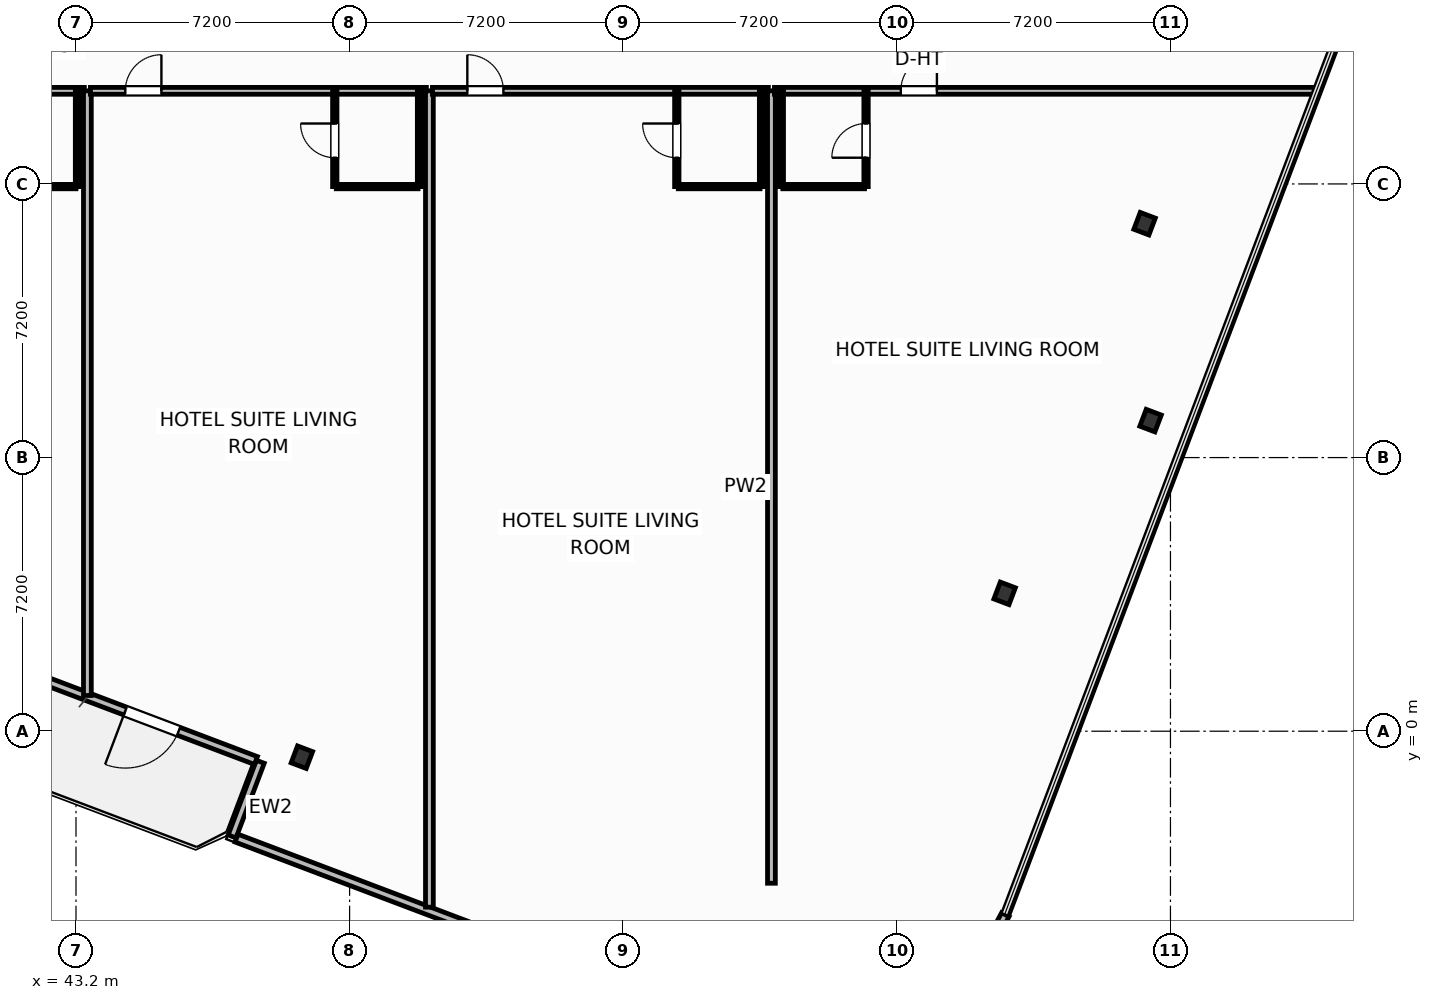
"""IFC4 building model, lengths in metres.
Left out: names, types, materials, properties, quantities, classifications, styles, units other than length and angle.
Written with IfcOpenShell. Run it as: python <this file> out.ifc"""

import sys

from ifc_helpers import new_model, si_unit, direction, frame, frame_2d, origin, origin_2d, place, context, subcontext, project, spatial, rectangle, i_section, extrude, element, fill, save


model = new_model("IFC4")
c1 = context("Model", 3, precision=1e-05, world=origin(), true_north=direction((0.0, 1.0)))
c2 = subcontext(c1, "Body", "Model", "MODEL_VIEW")
j1 = project(units=[si_unit("LENGTHUNIT", "METRE"), si_unit("PLANEANGLEUNIT", "RADIAN")], contexts=[c1])
p1 = place(None, origin())
s1 = spatial("IfcSite", under=j1, at=p1, CompositionType="ELEMENT")
p2 = place(p1, origin())
s2 = spatial("IfcBuilding", under=s1, at=p2, CompositionType="ELEMENT")
p3 = place(p2, frame((0.0, 0.0, 76.2)))
s3 = spatial("IfcBuildingStorey", under=s2, at=p3, CompositionType="ELEMENT", Elevation=76.2)
for number, where, z_axis, x_axis in (
    (1, (49.144, -0.684, 0.0), (0.0, 0.0, 1.0), (0.935, -0.354, 0.0)),
    (2, (67.637, 3.628, 0.0), (0.0, 0.0, 1.0), (0.935, -0.354, 0.0)),
    (3, (71.477, 8.173, 0.0), (0.0, 0.0, 1.0), (0.935, -0.354, 0.0)),
    (4, (71.319, 13.354, 0.0), (0.0, 0.0, 1.0), (0.935, -0.354, 0.0)),
):
    element("IfcColumn", number, at=place(p3, frame(where, z_axis=z_axis, x_axis=x_axis)), inside=s3, PredefinedType="COLUMN", context=c2, shape_type="SweptSolid", body=[
        extrude(i_section(OverallWidth=0.424, OverallDepth=0.474, WebThickness=0.048, FlangeThickness=0.077, FilletRadius=0.025, at=origin_2d()), origin(), (0.0, 0.0, 1.0), 3.7),
    ])
p4 = place(p3, frame((47.935, -0.771, 0.0), z_axis=(0.0, 0.0, 1.0), x_axis=(-0.935227640088, 0.354046976001, 0.0)))
e5 = element("IfcWall", 5, at=p4, inside=s3, PredefinedType="SOLIDWALL", context=c2, shape_type="SweptSolid", body=[
    extrude(rectangle(XDim=6.0, YDim=0.22, at=frame_2d((3.0, 0.0))), origin(), (0.0, 0.0, 1.0), 2.73),
])
p5 = place(p4, frame((2.176, 0.0, 0.0)))
e6 = element("IfcOpeningElement", 6, at=p5, cuts=e5, PredefinedType="OPENING", context=c2, shape_type="SweptSolid", body=[
    extrude(rectangle(XDim=1.5, YDim=2.25, at=frame_2d((0.75, 1.125))), frame((0.0, 0.12, 0.0), z_axis=(0.0, -1.0, 0.0), x_axis=(1.0, 0.0, 0.0)), (0.0, 0.0, 1.0), 0.24),
])
p6 = place(p3, frame((48.051, -0.805, 0.0), z_axis=(0.0, 0.0, 1.0), x_axis=(-0.353988291547, -0.935249854022, 0.0)))
e7 = element("IfcWall", 7, at=p6, inside=s3, PredefinedType="SOLIDWALL", context=c2, shape_type="SweptSolid", body=[
    extrude(rectangle(XDim=2.1, YDim=0.22, at=frame_2d((1.05, 0.0))), origin(), (0.0, 0.0, 1.0), 2.73),
])
p7 = place(p3, frame((47.424, -2.813, 0.0), z_axis=(0.0, 0.0, 1.0), x_axis=(0.935225962032, -0.354051408614, 0.0)))
e8 = element("IfcWall", 8, at=p7, inside=s3, PredefinedType="SOLIDWALL", context=c2, shape_type="SweptSolid", body=[
    extrude(rectangle(XDim=14.347, YDim=0.22, at=frame_2d((7.173, 0.0))), origin(), (0.0, 0.0, 1.0), 2.73),
])
p8 = place(p7, frame((6.348, 0.0, 0.8)))
e9 = element("IfcOpeningElement", 9, at=p8, cuts=e8, PredefinedType="OPENING", context=c2, shape_type="SweptSolid", body=[
    extrude(rectangle(XDim=1.65, YDim=1.65, at=frame_2d((0.825, 0.825))), frame((0.0, 0.12, 0.0), z_axis=(0.0, -1.0, 0.0), x_axis=(1.0, 0.0, 0.0)), (0.0, 0.0, 1.0), 0.24),
])
p9 = place(p3, frame((67.015, -6.019, 0.0), z_axis=(0.0, 0.0, 1.0), x_axis=(0.473077364598, 0.881020889142, 0.0)))
e10 = element("IfcWall", 10, at=p9, inside=s3, PredefinedType="SOLIDWALL", context=c2, shape_type="SweptSolid", body=[
    extrude(rectangle(XDim=1.353, YDim=0.22, at=frame_2d((0.677, 0.0))), origin(), (0.0, 0.0, 1.0), 2.73),
])
p10 = place(p3, frame((34.58, 16.85, 0.0), z_axis=(0.0, 0.0, 1.0), x_axis=(1.0, 0.0, 0.0)))
e11 = element("IfcWall", 11, at=p10, inside=s3, PredefinedType="PARTITIONING", context=c2, shape_type="SweptSolid", body=[
    extrude(rectangle(XDim=8.84, YDim=0.18, at=frame_2d((4.42, 0.0))), origin(), (0.0, 0.0, 1.0), 3.45),
])
p11 = place(p10, frame((0.918, 0.0, 0.0)))
e12 = element("IfcOpeningElement", 12, at=p11, cuts=e11, PredefinedType="OPENING", context=c2, shape_type="SweptSolid", body=[
    extrude(rectangle(XDim=0.95, YDim=2.15, at=frame_2d((0.475, 1.075))), frame((0.0, 0.1, 0.0), z_axis=(0.0, -1.0, 0.0), x_axis=(1.0, 0.0, 0.0)), (0.0, 0.0, 1.0), 0.2),
])
p12 = place(p3, frame((41.05, 14.33, 0.0), z_axis=(0.0, 0.0, 1.0), x_axis=(1.0, 0.0, 0.0)))
e13 = element("IfcWall", 13, at=p12, inside=s3, PredefinedType="PARTITIONING", context=c2, shape_type="SweptSolid", body=[
    extrude(rectangle(XDim=2.15, YDim=0.115, at=frame_2d((1.075, 0.0))), origin(), (0.0, 0.0, 1.0), 3.45),
])
p13 = place(p3, frame((43.24, 14.33, 0.0), z_axis=(0.0, 0.0, 1.0), x_axis=(0.0, 1.0, 0.0)))
e14 = element("IfcWall", 14, at=p13, inside=s3, PredefinedType="PARTITIONING", context=c2, shape_type="SweptSolid", body=[
    extrude(rectangle(XDim=2.52, YDim=0.115, at=frame_2d((1.26, 0.0))), origin(), (0.0, 0.0, 1.0), 2.58),
])
p14 = place(p3, frame((43.5, 0.939, 0.0), z_axis=(0.0, 0.0, 1.0), x_axis=(0.0, 1.0, 0.0)))
e15 = element("IfcWall", 15, at=p14, inside=s3, PredefinedType="PARTITIONING", context=c2, shape_type="SweptSolid", body=[
    extrude(rectangle(XDim=15.911, YDim=0.205, at=frame_2d((7.955, 0.0))), origin(), (0.0, 0.0, 1.0), 2.58),
])
p15 = place(p3, frame((43.58, 16.85, 0.0), z_axis=(0.0, 0.0, 1.0), x_axis=(1.0, 0.0, 0.0)))
e16 = element("IfcWall", 16, at=p15, inside=s3, PredefinedType="PARTITIONING", context=c2, shape_type="SweptSolid", body=[
    extrude(rectangle(XDim=8.84, YDim=0.18, at=frame_2d((4.42, 0.0))), origin(), (0.0, 0.0, 1.0), 3.45),
])
p16 = place(p15, frame((0.918, 0.0, 0.0)))
e17 = element("IfcOpeningElement", 17, at=p16, cuts=e16, PredefinedType="OPENING", context=c2, shape_type="SweptSolid", body=[
    extrude(rectangle(XDim=0.95, YDim=2.15, at=frame_2d((0.475, 1.075))), frame((0.0, 0.1, 0.0), z_axis=(0.0, -1.0, 0.0), x_axis=(1.0, 0.0, 0.0)), (0.0, 0.0, 1.0), 0.2),
])
p17 = place(p3, frame((50.05, 14.33, 0.0), z_axis=(0.0, 0.0, 1.0), x_axis=(1.0, 0.0, 0.0)))
e18 = element("IfcWall", 18, at=p17, inside=s3, PredefinedType="PARTITIONING", context=c2, shape_type="SweptSolid", body=[
    extrude(rectangle(XDim=2.15, YDim=0.115, at=frame_2d((1.075, 0.0))), origin(), (0.0, 0.0, 1.0), 3.45),
])
p18 = place(p3, frame((50.01, 14.33, 0.0), z_axis=(0.0, 0.0, 1.0), x_axis=(0.0, 1.0, 0.0)))
e19 = element("IfcWall", 19, at=p18, inside=s3, PredefinedType="PARTITIONING", context=c2, shape_type="SweptSolid", body=[
    extrude(rectangle(XDim=2.52, YDim=0.115, at=frame_2d((1.26, 0.0))), origin(), (0.0, 0.0, 1.0), 3.45),
])
p19 = place(p18, frame((0.76, 0.0, 0.0)))
e20 = element("IfcOpeningElement", 20, at=p19, cuts=e19, PredefinedType="OPENING", context=c2, shape_type="SweptSolid", body=[
    extrude(rectangle(XDim=0.9, YDim=2.05, at=frame_2d((0.45, 1.025))), frame((0.0, 0.067, 0.0), z_axis=(0.0, -1.0, 0.0), x_axis=(1.0, 0.0, 0.0)), (0.0, 0.0, 1.0), 0.135),
])
p20 = place(p3, frame((52.24, 14.33, 0.0), z_axis=(0.0, 0.0, 1.0), x_axis=(0.0, 1.0, 0.0)))
e21 = element("IfcWall", 21, at=p20, inside=s3, PredefinedType="PARTITIONING", context=c2, shape_type="SweptSolid", body=[
    extrude(rectangle(XDim=2.52, YDim=0.115, at=frame_2d((1.26, 0.0))), origin(), (0.0, 0.0, 1.0), 3.45),
])
p21 = place(p3, frame((52.5, -4.63, 0.0), z_axis=(0.0, 0.0, 1.0), x_axis=(0.0, 1.0, 0.0)))
e22 = element("IfcWall", 22, at=p21, inside=s3, PredefinedType="PARTITIONING", context=c2, shape_type="SweptSolid", body=[
    extrude(rectangle(XDim=21.48, YDim=0.205, at=frame_2d((10.74, 0.0))), origin(), (0.0, 0.0, 1.0), 2.58),
])
p22 = place(p3, frame((52.58, 16.85, 0.0), z_axis=(0.0, 0.0, 1.0), x_axis=(1.0, 0.0, 0.0)))
e23 = element("IfcWall", 23, at=p22, inside=s3, PredefinedType="PARTITIONING", context=c2, shape_type="SweptSolid", body=[
    extrude(rectangle(XDim=8.84, YDim=0.18, at=frame_2d((4.42, 0.0))), origin(), (0.0, 0.0, 1.0), 2.58),
])
p23 = place(p22, frame((0.918, 0.0, 0.0)))
e24 = element("IfcOpeningElement", 24, at=p23, cuts=e23, PredefinedType="OPENING", context=c2, shape_type="SweptSolid", body=[
    extrude(rectangle(XDim=0.95, YDim=2.15, at=frame_2d((0.475, 1.075))), frame((0.0, 0.1, 0.0), z_axis=(0.0, -1.0, 0.0), x_axis=(1.0, 0.0, 0.0)), (0.0, 0.0, 1.0), 0.2),
])
p24 = place(p3, frame((59.05, 14.33, 0.0), z_axis=(0.0, 0.0, 1.0), x_axis=(1.0, 0.0, 0.0)))
e25 = element("IfcWall", 25, at=p24, inside=s3, PredefinedType="PARTITIONING", context=c2, shape_type="SweptSolid", body=[
    extrude(rectangle(XDim=2.15, YDim=0.115, at=frame_2d((1.075, 0.0))), origin(), (0.0, 0.0, 1.0), 3.45),
])
p25 = place(p3, frame((59.01, 14.33, 0.0), z_axis=(0.0, 0.0, 1.0), x_axis=(0.0, 1.0, 0.0)))
e26 = element("IfcWall", 26, at=p25, inside=s3, PredefinedType="PARTITIONING", context=c2, shape_type="SweptSolid", body=[
    extrude(rectangle(XDim=2.52, YDim=0.115, at=frame_2d((1.26, 0.0))), origin(), (0.0, 0.0, 1.0), 3.45),
])
p26 = place(p25, frame((0.76, 0.0, 0.0)))
e27 = element("IfcOpeningElement", 27, at=p26, cuts=e26, PredefinedType="OPENING", context=c2, shape_type="SweptSolid", body=[
    extrude(rectangle(XDim=0.9, YDim=2.05, at=frame_2d((0.45, 1.025))), frame((0.0, 0.067, 0.0), z_axis=(0.0, -1.0, 0.0), x_axis=(1.0, 0.0, 0.0)), (0.0, 0.0, 1.0), 0.135),
])
p27 = place(p3, frame((61.24, 14.33, 0.0), z_axis=(0.0, 0.0, 1.0), x_axis=(0.0, 1.0, 0.0)))
e28 = element("IfcWall", 28, at=p27, inside=s3, PredefinedType="PARTITIONING", context=c2, shape_type="SweptSolid", body=[
    extrude(rectangle(XDim=2.52, YDim=0.115, at=frame_2d((1.26, 0.0))), origin(), (0.0, 0.0, 1.0), 3.45),
])
p28 = place(p3, frame((61.5, -4.0, 0.0), z_axis=(0.0, 0.0, 1.0), x_axis=(0.0, 1.0, 0.0)))
e29 = element("IfcWall", 29, at=p28, inside=s3, PredefinedType="PARTITIONING", context=c2, shape_type="SweptSolid", body=[
    extrude(rectangle(XDim=20.85, YDim=0.205, at=frame_2d((10.425, 0.0))), origin(), (0.0, 0.0, 1.0), 3.45),
])
p29 = place(p3, frame((61.58, 16.85, 0.0), z_axis=(0.0, 0.0, 1.0), x_axis=(1.0, 0.0, 0.0)))
e30 = element("IfcWall", 30, at=p29, inside=s3, PredefinedType="PARTITIONING", context=c2, shape_type="SweptSolid", body=[
    extrude(rectangle(XDim=14.222, YDim=0.18, at=frame_2d((7.111, 0.0))), origin(), (0.0, 0.0, 1.0), 3.45),
])
p30 = place(p29, frame((3.325, 0.0, 0.0)))
e31 = element("IfcOpeningElement", 31, at=p30, cuts=e30, PredefinedType="OPENING", context=c2, shape_type="SweptSolid", body=[
    extrude(rectangle(XDim=0.95, YDim=2.15, at=frame_2d((0.475, 1.075))), frame((0.0, 0.1, 0.0), z_axis=(0.0, -1.0, 0.0), x_axis=(1.0, 0.0, 0.0)), (0.0, 0.0, 1.0), 0.2),
])
p31 = place(p3, frame((61.8, 14.33, 0.0), z_axis=(0.0, 0.0, 1.0), x_axis=(1.0, 0.0, 0.0)))
e32 = element("IfcWall", 32, at=p31, inside=s3, PredefinedType="PARTITIONING", context=c2, shape_type="SweptSolid", body=[
    extrude(rectangle(XDim=2.15, YDim=0.115, at=frame_2d((1.075, 0.0))), origin(), (0.0, 0.0, 1.0), 3.45),
])
p32 = place(p3, frame((63.99, 14.33, 0.0), z_axis=(0.0, 0.0, 1.0), x_axis=(0.0, 1.0, 0.0)))
e33 = element("IfcWall", 33, at=p32, inside=s3, PredefinedType="PARTITIONING", context=c2, shape_type="SweptSolid", body=[
    extrude(rectangle(XDim=2.52, YDim=0.115, at=frame_2d((1.26, 0.0))), origin(), (0.0, 0.0, 1.0), 3.45),
])
p33 = place(p32, frame((0.76, 0.0, 0.0)))
e34 = element("IfcOpeningElement", 34, at=p33, cuts=e33, PredefinedType="OPENING", context=c2, shape_type="SweptSolid", body=[
    extrude(rectangle(XDim=0.9, YDim=2.05, at=frame_2d((0.45, 1.025))), frame((0.0, 0.067, 0.0), z_axis=(0.0, -1.0, 0.0), x_axis=(1.0, 0.0, 0.0)), (0.0, 0.0, 1.0), 0.135),
])
p34 = place(p3, frame((61.76, 14.33, 0.0), z_axis=(0.0, 0.0, 1.0), x_axis=(0.0, 1.0, 0.0)))
e35 = element("IfcWall", 35, at=p34, inside=s3, PredefinedType="PARTITIONING", context=c2, shape_type="SweptSolid", body=[
    extrude(rectangle(XDim=2.52, YDim=0.115, at=frame_2d((1.26, 0.0))), origin(), (0.0, 0.0, 1.0), 3.45),
])
p35 = place(p5, origin())
e36 = element("IfcDoor", 36, at=p35, inside=s3, OperationType="SINGLE_SWING_RIGHT", PredefinedType="DOOR", context=c2, shape_type="SweptSolid", body=[
    extrude(rectangle(XDim=1.5, YDim=2.25, at=frame_2d((0.75, 1.125))), frame((0.0, 0.025, 0.0), z_axis=(0.0, -1.0, 0.0), x_axis=(1.0, 0.0, 0.0)), (0.0, 0.0, 1.0), 0.05),
])
fill(e6, e36)
p36 = place(p16, origin())
e37 = element("IfcDoor", 37, at=p36, inside=s3, OperationType="SINGLE_SWING_RIGHT", PredefinedType="DOOR", context=c2, shape_type="SweptSolid", body=[
    extrude(rectangle(XDim=0.95, YDim=2.15, at=frame_2d((0.475, 1.075))), frame((0.0, 0.025, 0.0), z_axis=(0.0, -1.0, 0.0), x_axis=(1.0, 0.0, 0.0)), (0.0, 0.0, 1.0), 0.05),
])
fill(e17, e37)
p37 = place(p19, origin())
e38 = element("IfcDoor", 38, at=p37, inside=s3, OperationType="SINGLE_SWING_RIGHT", PredefinedType="DOOR", context=c2, shape_type="SweptSolid", body=[
    extrude(rectangle(XDim=0.9, YDim=2.05, at=frame_2d((0.45, 1.025))), frame((0.0, 0.025, 0.0), z_axis=(0.0, -1.0, 0.0), x_axis=(1.0, 0.0, 0.0)), (0.0, 0.0, 1.0), 0.05),
])
fill(e20, e38)
p38 = place(p23, origin())
e39 = element("IfcDoor", 39, at=p38, inside=s3, OperationType="SINGLE_SWING_LEFT", PredefinedType="DOOR", context=c2, shape_type="SweptSolid", body=[
    extrude(rectangle(XDim=0.95, YDim=2.15, at=frame_2d((0.475, 1.075))), frame((0.0, 0.025, 0.0), z_axis=(0.0, -1.0, 0.0), x_axis=(1.0, 0.0, 0.0)), (0.0, 0.0, 1.0), 0.05),
])
fill(e24, e39)
p39 = place(p26, origin())
e40 = element("IfcDoor", 40, at=p39, inside=s3, OperationType="SINGLE_SWING_RIGHT", PredefinedType="DOOR", context=c2, shape_type="SweptSolid", body=[
    extrude(rectangle(XDim=0.9, YDim=2.05, at=frame_2d((0.45, 1.025))), frame((0.0, 0.025, 0.0), z_axis=(0.0, -1.0, 0.0), x_axis=(1.0, 0.0, 0.0)), (0.0, 0.0, 1.0), 0.05),
])
fill(e27, e40)
p40 = place(p30, origin())
e41 = element("IfcDoor", 41, at=p40, inside=s3, OperationType="SINGLE_SWING_RIGHT", PredefinedType="DOOR", context=c2, shape_type="SweptSolid", body=[
    extrude(rectangle(XDim=0.95, YDim=2.15, at=frame_2d((0.475, 1.075))), frame((0.0, 0.025, 0.0), z_axis=(0.0, -1.0, 0.0), x_axis=(1.0, 0.0, 0.0)), (0.0, 0.0, 1.0), 0.05),
])
fill(e31, e41)
p41 = place(p33, origin())
e42 = element("IfcDoor", 42, at=p41, inside=s3, OperationType="SINGLE_SWING_LEFT", PredefinedType="DOOR", context=c2, shape_type="SweptSolid", body=[
    extrude(rectangle(XDim=0.9, YDim=2.05, at=frame_2d((0.45, 1.025))), frame((0.0, 0.025, 0.0), z_axis=(0.0, -1.0, 0.0), x_axis=(1.0, 0.0, 0.0)), (0.0, 0.0, 1.0), 0.05),
])
fill(e34, e42)
save(model, sys.argv[1])
